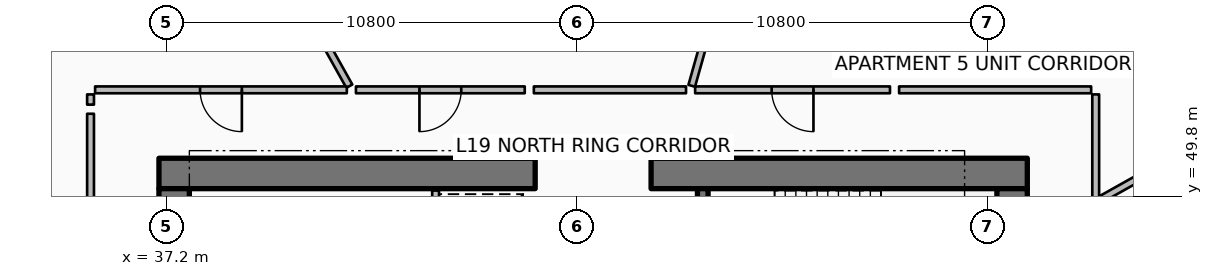
"""IFC4 building model, lengths in metres.
Left out: names, types, materials, properties, quantities, classifications, styles, units other than length and angle.
Written with IfcOpenShell. Run it as: python <this file> out.ifc"""

import sys

from ifc_helpers import new_model, si_unit, direction, frame, frame_2d, origin, place, context, subcontext, project, spatial, rectangle, extrude, element, fill, save


model = new_model("IFC4")
c1 = context("Model", 3, precision=1e-05, world=origin(), true_north=direction((0.0, 1.0)))
c2 = subcontext(c1, "Body", "Model", "MODEL_VIEW")
j1 = project(units=[si_unit("LENGTHUNIT", "METRE"), si_unit("PLANEANGLEUNIT", "RADIAN")], contexts=[c1])
p1 = place(None, origin())
s1 = spatial("IfcSite", under=j1, at=p1, CompositionType="ELEMENT")
p2 = place(p1, origin())
s2 = spatial("IfcBuilding", under=s1, at=p2, CompositionType="ELEMENT")
p3 = place(p2, frame((0.0, 0.0, 78.9)))
s3 = spatial("IfcBuildingStorey", under=s2, at=p3, CompositionType="ELEMENT", Elevation=78.9)
p4 = place(p3, frame((37.0, 50.4, 0.0), z_axis=(0.0, 0.0, 1.0), x_axis=(1.0, 0.0, 0.0)))
e1 = element("IfcWall", 1, at=p4, inside=s3, PredefinedType="SHEAR", context=c2, shape_type="SweptSolid", body=[
    extrude(rectangle(XDim=9.9, YDim=0.8, at=frame_2d((4.95, 0.0))), origin(), (0.0, 0.0, 1.0), 3.75),
])
p5 = place(p3, frame((49.95, 50.4, 0.0), z_axis=(0.0, 0.0, 1.0), x_axis=(1.0, 0.0, 0.0)))
e2 = element("IfcWall", 2, at=p5, inside=s3, PredefinedType="SHEAR", context=c2, shape_type="SweptSolid", body=[
    extrude(rectangle(XDim=9.9, YDim=0.8, at=frame_2d((4.95, 0.0))), origin(), (0.0, 0.0, 1.0), 3.75),
])
for number, where, z_axis, x_axis in (
    (3, (37.4, 34.0, 0.0), (0.0, 0.0, 1.0), (0.0, 1.0, 0.0)),
    (4, (59.45, 34.0, 0.0), (0.0, 0.0, 1.0), (0.0, 1.0, 0.0)),
):
    element("IfcWall", number, at=place(p3, frame(where, z_axis=z_axis, x_axis=x_axis)), inside=s3, PredefinedType="SHEAR", context=c2, shape_type="SweptSolid", body=[
        extrude(rectangle(XDim=16.0, YDim=0.8, at=frame_2d((8.0, 0.0))), origin(), (0.0, 0.0, 1.0), 3.75),
    ])
p6 = place(p3, frame((51.31, 46.5, 0.0), z_axis=(0.0, 0.0, 1.0), x_axis=(0.0, 1.0, 0.0)))
e5 = element("IfcWall", 5, at=p6, inside=s3, PredefinedType="SHEAR", context=c2, shape_type="SweptSolid", body=[
    extrude(rectangle(XDim=3.5, YDim=0.28, at=frame_2d((1.75, 0.0))), origin(), (0.0, 0.0, 1.0), 3.75),
])
p7 = place(p3, frame((44.28, 47.82, 0.0), z_axis=(0.0, 0.0, 1.0), x_axis=(0.0, 1.0, 0.0)))
e6 = element("IfcWall", 6, at=p7, inside=s3, PredefinedType="PARTITIONING", context=c2, shape_type="SweptSolid", body=[
    extrude(rectangle(XDim=2.13, YDim=0.18, at=frame_2d((1.065, 0.0))), origin(), (0.0, 0.0, 1.0), 3.5),
])
p8 = place(p3, frame((61.746, 49.698, 0.0), z_axis=(0.0, 0.0, 1.0), x_axis=(0.872489938668, 0.488632077256, 0.0)))
e7 = element("IfcWall", 7, at=p8, inside=s3, PredefinedType="PARTITIONING", context=c2, shape_type="SweptSolid", body=[
    extrude(rectangle(XDim=13.725, YDim=0.18, at=frame_2d((6.862, 0.0))), origin(), (0.0, 0.0, 1.0), 2.94),
])
p9 = place(p3, frame((51.019, 52.706, 0.0), z_axis=(0.0, 0.0, 1.0), x_axis=(0.271450895995, 0.962452290279, 0.0)))
e8 = element("IfcWall", 8, at=p9, inside=s3, PredefinedType="PARTITIONING", context=c2, shape_type="SweptSolid", body=[
    extrude(rectangle(XDim=15.014, YDim=0.18, at=frame_2d((7.507, 0.0))), origin(), (0.0, 0.0, 1.0), 2.94),
])
p10 = place(p3, frame((42.01, 52.696, 0.0), z_axis=(0.0, 0.0, 1.0), x_axis=(-0.488628442553, 0.872491974249, 0.0)))
e9 = element("IfcWall", 9, at=p10, inside=s3, PredefinedType="PARTITIONING", context=c2, shape_type="SweptSolid", body=[
    extrude(rectangle(XDim=11.563, YDim=0.18, at=frame_2d((5.782, 0.0))), origin(), (0.0, 0.0, 1.0), 2.94),
])
p11 = place(p3, frame((41.944, 52.6, 0.0), z_axis=(0.0, 0.0, 1.0), x_axis=(-1.0, 0.0, 0.0)))
e10 = element("IfcWall", 10, at=p11, inside=s3, PredefinedType="PARTITIONING", context=c2, shape_type="SweptSolid", body=[
    extrude(rectangle(XDim=6.624, YDim=0.18, at=frame_2d((3.312, 0.0))), origin(), (0.0, 0.0, 1.0), 2.94),
])
p12 = place(p11, frame((2.762, 0.0, 0.0)))
e11 = element("IfcOpeningElement", 11, at=p12, cuts=e10, PredefinedType="OPENING", context=c2, shape_type="SweptSolid", body=[
    extrude(rectangle(XDim=1.1, YDim=2.1, at=frame_2d((0.55, 1.05))), frame((0.0, 0.1, 0.0), z_axis=(0.0, -1.0, 0.0), x_axis=(1.0, 0.0, 0.0)), (0.0, 0.0, 1.0), 0.2),
])
p13 = place(p3, frame((35.2, 52.48, 0.0), z_axis=(0.0, 0.0, 1.0), x_axis=(0.0, -1.0, 0.0)))
e12 = element("IfcWall", 12, at=p13, inside=s3, PredefinedType="PARTITIONING", context=c2, shape_type="SweptSolid", body=[
    extrude(rectangle(XDim=0.269, YDim=0.18, at=frame_2d((0.135, 0.0))), origin(), (0.0, 0.0, 1.0), 2.94),
])
p14 = place(p3, frame((35.2, 51.971, 0.0), z_axis=(0.0, 0.0, 1.0), x_axis=(0.0, -1.0, 0.0)))
e13 = element("IfcWall", 13, at=p14, inside=s3, PredefinedType="PARTITIONING", context=c2, shape_type="SweptSolid", body=[
    extrude(rectangle(XDim=6.241, YDim=0.18, at=frame_2d((3.12, 0.0))), origin(), (0.0, 0.0, 1.0), 2.94),
])
p15 = place(p3, frame((56.236, 52.6, 0.0), z_axis=(0.0, 0.0, 1.0), x_axis=(-1.0, 0.0, 0.0)))
e14 = element("IfcWall", 14, at=p15, inside=s3, PredefinedType="PARTITIONING", context=c2, shape_type="SweptSolid", body=[
    extrude(rectangle(XDim=5.127, YDim=0.18, at=frame_2d((2.563, 0.0))), origin(), (0.0, 0.0, 1.0), 2.94),
])
p16 = place(p15, frame((2.013, 0.0, 0.0)))
e15 = element("IfcOpeningElement", 15, at=p16, cuts=e14, PredefinedType="OPENING", context=c2, shape_type="SweptSolid", body=[
    extrude(rectangle(XDim=1.1, YDim=2.1, at=frame_2d((0.55, 1.05))), frame((0.0, 0.1, 0.0), z_axis=(0.0, -1.0, 0.0), x_axis=(1.0, 0.0, 0.0)), (0.0, 0.0, 1.0), 0.2),
])
p17 = place(p3, frame((61.65, 49.764, 0.0), z_axis=(0.0, 0.0, 1.0), x_axis=(0.0, 1.0, 0.0)))
e16 = element("IfcWall", 16, at=p17, inside=s3, PredefinedType="PARTITIONING", context=c2, shape_type="SweptSolid", body=[
    extrude(rectangle(XDim=2.716, YDim=0.18, at=frame_2d((1.358, 0.0))), origin(), (0.0, 0.0, 1.0), 2.94),
])
p18 = place(p3, frame((61.53, 52.6, 0.0), z_axis=(0.0, 0.0, 1.0), x_axis=(-1.0, 0.0, 0.0)))
e17 = element("IfcWall", 17, at=p18, inside=s3, PredefinedType="PARTITIONING", context=c2, shape_type="SweptSolid", body=[
    extrude(rectangle(XDim=5.054, YDim=0.18, at=frame_2d((2.527, 0.0))), origin(), (0.0, 0.0, 1.0), 2.94),
])
p19 = place(p3, frame((62.846, 53.527, 0.0), z_axis=(0.0, 0.0, 1.0), x_axis=(-0.663881646848, 0.747837655497, 0.0)))
e18 = element("IfcWall", 18, at=p19, inside=s3, PredefinedType="PARTITIONING", context=c2, shape_type="SweptSolid", body=[
    extrude(rectangle(XDim=2.483, YDim=0.125, at=frame_2d((1.242, 0.0))), origin(), (0.0, 0.0, 1.0), 2.94),
])
p20 = place(p19, frame((0.817, 0.0, 0.0)))
e19 = element("IfcOpeningElement", 19, at=p20, cuts=e18, PredefinedType="OPENING", context=c2, shape_type="SweptSolid", body=[
    extrude(rectangle(XDim=0.85, YDim=2.06, at=frame_2d((0.425, 1.03))), frame((0.0, 0.073, 0.0), z_axis=(0.0, -1.0, 0.0), x_axis=(1.0, 0.0, 0.0)), (0.0, 0.0, 1.0), 0.145),
])
p21 = place(p3, frame((46.625, 52.6, 0.0), z_axis=(0.0, 0.0, 1.0), x_axis=(-1.0, 0.0, 0.0)))
e20 = element("IfcWall", 20, at=p21, inside=s3, PredefinedType="PARTITIONING", context=c2, shape_type="SweptSolid", body=[
    extrude(rectangle(XDim=4.442, YDim=0.18, at=frame_2d((2.221, 0.0))), origin(), (0.0, 0.0, 1.0), 2.94),
])
p22 = place(p21, frame((1.671, 0.0, 0.0)))
e21 = element("IfcOpeningElement", 21, at=p22, cuts=e20, PredefinedType="OPENING", context=c2, shape_type="SweptSolid", body=[
    extrude(rectangle(XDim=1.1, YDim=2.1, at=frame_2d((0.55, 1.05))), frame((0.0, 0.1, 0.0), z_axis=(0.0, -1.0, 0.0), x_axis=(1.0, 0.0, 0.0)), (0.0, 0.0, 1.0), 0.2),
])
p23 = place(p3, frame((50.869, 52.6, 0.0), z_axis=(0.0, 0.0, 1.0), x_axis=(-1.0, 0.0, 0.0)))
e22 = element("IfcWall", 22, at=p23, inside=s3, PredefinedType="PARTITIONING", context=c2, shape_type="SweptSolid", body=[
    extrude(rectangle(XDim=4.004, YDim=0.18, at=frame_2d((2.002, 0.0))), origin(), (0.0, 0.0, 1.0), 2.94),
])
p24 = place(p12, origin())
e23 = element("IfcDoor", 23, at=p24, inside=s3, OperationType="SINGLE_SWING_LEFT", PredefinedType="DOOR", context=c2, shape_type="SweptSolid", body=[
    extrude(rectangle(XDim=1.1, YDim=2.1, at=frame_2d((0.55, 1.05))), frame((0.0, 0.025, 0.0), z_axis=(0.0, -1.0, 0.0), x_axis=(1.0, 0.0, 0.0)), (0.0, 0.0, 1.0), 0.05),
])
fill(e11, e23)
p25 = place(p16, origin())
e24 = element("IfcDoor", 24, at=p25, inside=s3, OperationType="SINGLE_SWING_LEFT", PredefinedType="DOOR", context=c2, shape_type="SweptSolid", body=[
    extrude(rectangle(XDim=1.1, YDim=2.1, at=frame_2d((0.55, 1.05))), frame((0.0, 0.025, 0.0), z_axis=(0.0, -1.0, 0.0), x_axis=(1.0, 0.0, 0.0)), (0.0, 0.0, 1.0), 0.05),
])
fill(e15, e24)
p26 = place(p22, origin())
e25 = element("IfcDoor", 25, at=p26, inside=s3, OperationType="SINGLE_SWING_RIGHT", PredefinedType="DOOR", context=c2, shape_type="SweptSolid", body=[
    extrude(rectangle(XDim=1.1, YDim=2.1, at=frame_2d((0.55, 1.05))), frame((0.0, 0.025, 0.0), z_axis=(0.0, -1.0, 0.0), x_axis=(1.0, 0.0, 0.0)), (0.0, 0.0, 1.0), 0.05),
])
fill(e21, e25)
save(model, sys.argv[1])
